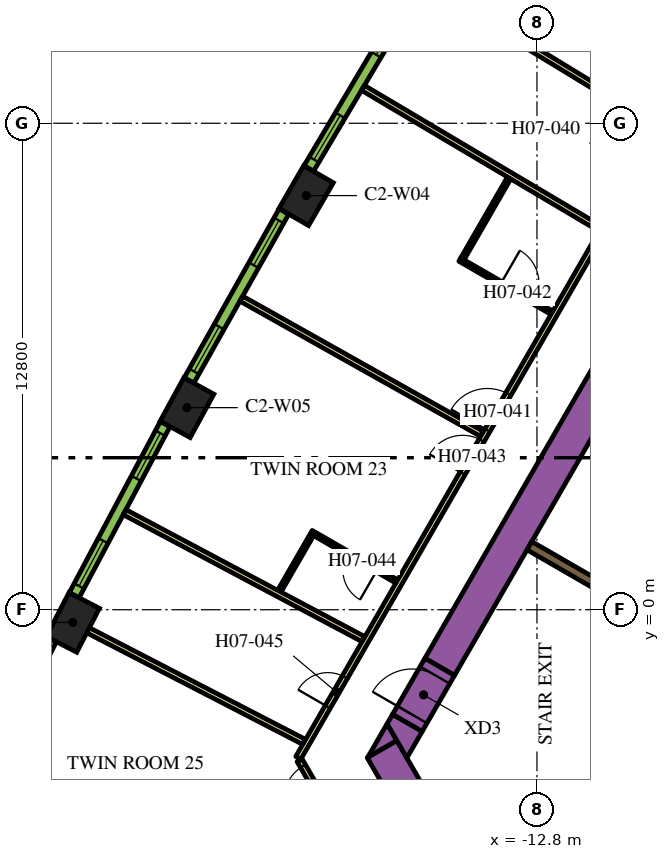
"""IFC4 building model, lengths in metres.
Left out: names, types, materials, properties, quantities, classifications, styles, units other than length and angle.
Written with IfcOpenShell. Run it as: python <this file> out.ifc"""

import sys

from ifc_helpers import new_model, si_unit, direction, frame, frame_2d, origin, origin_2d, place, context, subcontext, project, spatial, polyline, rectangle, outline, extrude, element, fill, save


model = new_model("IFC4")
c1 = context("Model", 3, precision=1e-05, world=origin(), true_north=direction((0.0, 1.0)))
c2 = subcontext(c1, "Body", "Model", "MODEL_VIEW")
j1 = project(units=[si_unit("LENGTHUNIT", "METRE"), si_unit("PLANEANGLEUNIT", "RADIAN")], contexts=[c1])
p1 = place(None, origin())
s1 = spatial("IfcSite", under=j1, at=p1, CompositionType="ELEMENT")
p2 = place(p1, origin())
s2 = spatial("IfcBuilding", under=s1, at=p2, CompositionType="ELEMENT")
p3 = place(p2, frame((0.0, 0.0, 103.2)))
s3 = spatial("IfcBuildingStorey", under=s2, at=p3, CompositionType="ELEMENT", Elevation=103.2)
for number, where, z_axis, x_axis in (
    (1, (-18.874, 10.897, 0.0), (0.0, 0.0, 1.0), (-0.5, -0.866, 0.0)),
    (2, (-22.009, 5.317, 0.0), (0.0, 0.0, 1.0), (-0.48, -0.877, 0.0)),
    (3, (-25.012, -0.334, 0.0), (0.0, 0.0, 1.0), (-0.459, -0.888, 0.0)),
):
    element("IfcColumn", number, at=place(p3, frame(where, z_axis=z_axis, x_axis=x_axis)), inside=s3, PredefinedType="COLUMN", context=c2, shape_type="SweptSolid", body=[
        extrude(rectangle(XDim=1.3, YDim=0.9, at=origin_2d()), origin(), (0.0, 0.0, 1.0), 3.9),
    ])
p4 = place(p3, frame((-15.36, -1.503, 0.0), z_axis=(0.0, 0.0, 1.0), x_axis=(0.50000389221, 0.866023156604, 0.0)))
e4 = element("IfcWall", 4, at=p4, inside=s3, PredefinedType="SOLIDWALL", context=c2, shape_type="SweptSolid", body=[
    extrude(rectangle(XDim=21.0, YDim=0.9, at=frame_2d((10.5, 0.0))), origin(), (0.0, 0.0, 1.0), 3.9),
])
p5 = place(p3, frame((-12.134, -11.883, 0.0), z_axis=(0.0, 0.0, 1.0), x_axis=(-0.500005339912, 0.866022320763, 0.0)))
e5 = element("IfcWall", 5, at=p5, inside=s3, PredefinedType="SOLIDWALL", context=c2, shape_type="SweptSolid", body=[
    extrude(rectangle(XDim=9.488, YDim=0.9, at=frame_2d((4.744, 0.0))), origin(), (0.0, 0.0, 1.0), 3.9),
])
p6 = place(p3, origin())
e6 = element("IfcWall", 6, at=p6, inside=s3, PredefinedType="SOLIDWALL", context=c2, shape_type="SweptSolid", body=[
    extrude(outline(polyline([(-16.489, -3.44), (-17.251, -3.88), (-16.743, -3.0), (-16.489, -3.44)])), origin(), (0.0, 0.0, 1.0), 3.9),
])
e7 = element("IfcWall", 7, at=p6, inside=s3, PredefinedType="SOLIDWALL", context=c2, shape_type="SweptSolid", body=[
    extrude(outline(polyline([(-15.82, -3.201), (-16.223, -3.9), (-16.743, -3.0), (-16.599, -2.751), (-15.82, -3.201)])), origin(), (0.0, 0.0, 1.0), 3.9),
])
p7 = place(p3, frame((-14.44, -6.49, 0.0), z_axis=(0.0, 0.0, 1.0), x_axis=(0.866022966069, 0.500004222222, 0.0)))
e8 = element("IfcWall", 8, at=p7, inside=s3, PredefinedType="SOLIDWALL", context=c2, shape_type="SweptSolid", body=[
    extrude(rectangle(XDim=6.8, YDim=0.25, at=frame_2d((3.4, 0.0))), origin(), (0.0, 0.0, 1.0), 3.9),
])
p8 = place(p3, frame((-8.106, -1.14, 0.0), z_axis=(0.0, 0.0, 1.0), x_axis=(-0.866000643155, 0.500042884217, 0.0)))
e9 = element("IfcWall", 9, at=p8, inside=s3, PredefinedType="SOLIDWALL", context=c2, shape_type="SweptSolid", body=[
    extrude(rectangle(XDim=5.65, YDim=0.25, at=frame_2d((2.825, 0.0))), origin(), (0.0, 0.0, 1.0), 3.9),
])
p9 = place(p3, frame((-16.209, -2.976, 0.0), z_axis=(0.0, 0.0, 1.0), x_axis=(0.499954529098, 0.86605165483, 0.0)))
e10 = element("IfcWall", 10, at=p9, inside=s3, PredefinedType="SOLIDWALL", context=c2, shape_type="SweptSolid", body=[
    extrude(rectangle(XDim=1.7, YDim=0.9, at=frame_2d((0.85, 0.0))), origin(), (0.0, 0.0, 1.0), 3.9),
])
p10 = place(p9, frame((0.25, 0.0, 0.0)))
e11 = element("IfcOpeningElement", 11, at=p10, cuts=e10, PredefinedType="OPENING", context=c2, shape_type="SweptSolid", body=[
    extrude(rectangle(XDim=1.2, YDim=2.1, at=frame_2d((0.6, 1.05))), frame((0.0, 0.46, 0.0), z_axis=(0.0, -1.0, 0.0), x_axis=(1.0, 0.0, 0.0)), (0.0, 0.0, 1.0), 0.92),
])
p11 = place(p3, frame((-19.081, -3.9, 0.0), z_axis=(0.0, 0.0, 1.0), x_axis=(0.499998313975, 0.866026377209, 0.0)))
e12 = element("IfcWall", 12, at=p11, inside=s3, PredefinedType="PARTITIONING", context=c2, shape_type="SweptSolid", body=[
    extrude(rectangle(XDim=25.766, YDim=0.15, at=frame_2d((12.883, 0.0))), origin(), (0.0, 0.0, 1.0), 2.75),
])
p12 = place(p11, frame((19.306, 0.0, 0.0)))
e13 = element("IfcOpeningElement", 13, at=p12, cuts=e12, PredefinedType="OPENING", context=c2, shape_type="SweptSolid", body=[
    extrude(rectangle(XDim=1.0, YDim=2.1, at=frame_2d((0.5, 1.05))), frame((0.0, 0.085, 0.0), z_axis=(0.0, -1.0, 0.0), x_axis=(1.0, 0.0, 0.0)), (0.0, 0.0, 1.0), 0.17),
])
p13 = place(p11, frame((17.144, 0.0, 0.0)))
e14 = element("IfcOpeningElement", 14, at=p13, cuts=e12, PredefinedType="OPENING", context=c2, shape_type="SweptSolid", body=[
    extrude(rectangle(XDim=0.9, YDim=2.1, at=frame_2d((0.45, 1.05))), frame((0.0, 0.085, 0.0), z_axis=(0.0, -1.0, 0.0), x_axis=(1.0, 0.0, 0.0)), (0.0, 0.0, 1.0), 0.17),
])
p14 = place(p11, frame((9.955, 0.0, 0.0)))
e15 = element("IfcOpeningElement", 15, at=p14, cuts=e12, PredefinedType="OPENING", context=c2, shape_type="SweptSolid", body=[
    extrude(rectangle(XDim=1.1, YDim=2.1, at=frame_2d((0.55, 1.05))), frame((0.0, 0.085, 0.0), z_axis=(0.0, -1.0, 0.0), x_axis=(1.0, 0.0, 0.0)), (0.0, 0.0, 1.0), 0.17),
])
p15 = place(p11, frame((8.648, 0.0, 0.0)))
e16 = element("IfcOpeningElement", 16, at=p15, cuts=e12, PredefinedType="OPENING", context=c2, shape_type="SweptSolid", body=[
    extrude(rectangle(XDim=1.0, YDim=2.1, at=frame_2d((0.5, 1.05))), frame((0.0, 0.085, 0.0), z_axis=(0.0, -1.0, 0.0), x_axis=(1.0, 0.0, 0.0)), (0.0, 0.0, 1.0), 0.17),
])
p16 = place(p11, frame((1.553, 0.0, 0.0)))
e17 = element("IfcOpeningElement", 17, at=p16, cuts=e12, PredefinedType="OPENING", context=c2, shape_type="SweptSolid", body=[
    extrude(rectangle(XDim=0.9, YDim=2.1, at=frame_2d((0.45, 1.05))), frame((0.0, 0.085, 0.0), z_axis=(0.0, -1.0, 0.0), x_axis=(1.0, 0.0, 0.0)), (0.0, 0.0, 1.0), 0.17),
])
p17 = place(p3, frame((-16.412, -8.523, 0.0), z_axis=(0.0, 0.0, 1.0), x_axis=(-0.500001929737, 0.866024289647, 0.0)))
e18 = element("IfcWall", 18, at=p17, inside=s3, PredefinedType="PARTITIONING", context=c2, shape_type="SweptSolid", body=[
    extrude(rectangle(XDim=5.268, YDim=0.15, at=frame_2d((2.634, 0.0))), origin(), (0.0, 0.0, 1.0), 2.75),
])
p18 = place(p17, frame((4.088, 0.0, 0.0)))
e19 = element("IfcOpeningElement", 19, at=p18, cuts=e18, PredefinedType="OPENING", context=c2, shape_type="SweptSolid", body=[
    extrude(rectangle(XDim=1.0, YDim=2.1, at=frame_2d((0.5, 1.05))), frame((0.0, 0.085, 0.0), z_axis=(0.0, -1.0, 0.0), x_axis=(1.0, 0.0, 0.0)), (0.0, 0.0, 1.0), 0.17),
])
p19 = place(p3, frame((-24.613, -0.541, 0.0), z_axis=(0.0, 0.0, 1.0), x_axis=(0.888459912519, -0.458954228487, 0.0)))
e20 = element("IfcWall", 20, at=p19, inside=s3, PredefinedType="PARTITIONING", context=c2, shape_type="SweptSolid", body=[
    extrude(rectangle(XDim=6.392, YDim=0.15, at=frame_2d((3.196, 0.0))), origin(), (0.0, 0.0, 1.0), 2.75),
])
p20 = place(p3, frame((-23.652, 2.567, 0.0), z_axis=(0.0, 0.0, 1.0), x_axis=(0.883019237957, -0.469336793144, 0.0)))
e21 = element("IfcWall", 21, at=p20, inside=s3, PredefinedType="PARTITIONING", context=c2, shape_type="SweptSolid", body=[
    extrude(rectangle(XDim=7.111, YDim=0.15, at=frame_2d((3.555, 0.0))), origin(), (0.0, 0.0, 1.0), 2.75),
])
for number, where, z_axis, x_axis in (
    (22, (-20.581, 8.185, 0.0), (0.0, 0.0, 1.0), (0.872, -0.49, 0.0)),
    (23, (-17.379, 13.731, 0.0), (0.0, 0.0, 1.0), (0.86, -0.51, 0.0)),
):
    element("IfcWall", number, at=place(p3, frame(where, z_axis=z_axis, x_axis=x_axis)), inside=s3, PredefinedType="PARTITIONING", context=c2, shape_type="SweptSolid", body=[
        extrude(rectangle(XDim=7.257, YDim=0.15, at=frame_2d((3.628, 0.0))), origin(), (0.0, 0.0, 1.0), 2.75),
    ])
p21 = place(p3, frame((-15.225, 16.167, 0.0), z_axis=(0.0, 0.0, 1.0), x_axis=(0.854088713274, -0.520127359266, 0.0)))
e24 = element("IfcWall", 24, at=p21, inside=s3, PredefinedType="PARTITIONING", context=c2, shape_type="SweptSolid", body=[
    extrude(rectangle(XDim=6.611, YDim=0.15, at=frame_2d((3.305, 0.0))), origin(), (0.0, 0.0, 1.0), 2.75),
])
p22 = place(p3, frame((-14.83, 9.213, 0.0), z_axis=(0.0, 0.0, 1.0), x_axis=(0.866034573852, -0.49998411664, 0.0)))
e25 = element("IfcWall", 25, at=p22, inside=s3, PredefinedType="PARTITIONING", context=c2, shape_type="SweptSolid", body=[
    extrude(rectangle(XDim=2.8, YDim=0.1, at=frame_2d((1.4, 0.0))), origin(), (0.0, 0.0, 1.0), 2.75),
])
p23 = place(p22, frame((1.25, 0.0, 0.0)))
e26 = element("IfcOpeningElement", 26, at=p23, cuts=e25, PredefinedType="OPENING", context=c2, shape_type="SweptSolid", body=[
    extrude(rectangle(XDim=1.0, YDim=2.1, at=frame_2d((0.5, 1.05))), frame((0.0, 0.06, 0.0), z_axis=(0.0, -1.0, 0.0), x_axis=(1.0, 0.0, 0.0)), (0.0, 0.0, 1.0), 0.12),
])
p24 = place(p3, frame((-14.762, 9.231, 0.0), z_axis=(0.0, 0.0, 1.0), x_axis=(0.500003092839, 0.866023618125, 0.0)))
e27 = element("IfcWall", 27, at=p24, inside=s3, PredefinedType="PARTITIONING", context=c2, shape_type="SweptSolid", body=[
    extrude(rectangle(XDim=2.46, YDim=0.1, at=frame_2d((1.23, 0.0))), origin(), (0.0, 0.0, 1.0), 2.75),
])
p25 = place(p3, frame((-16.487, 0.743, 0.0), z_axis=(0.0, 0.0, 1.0), x_axis=(-0.866021400173, 0.500006934395, 0.0)))
e28 = element("IfcWall", 28, at=p25, inside=s3, PredefinedType="PARTITIONING", context=c2, shape_type="SweptSolid", body=[
    extrude(rectangle(XDim=2.6, YDim=0.1, at=frame_2d((1.3, 0.0))), origin(), (0.0, 0.0, 1.0), 2.75),
])
p26 = place(p25, frame((0.6, 0.0, 0.0)))
e29 = element("IfcOpeningElement", 29, at=p26, cuts=e28, PredefinedType="OPENING", context=c2, shape_type="SweptSolid", body=[
    extrude(rectangle(XDim=0.9, YDim=2.1, at=frame_2d((0.45, 1.05))), frame((0.0, 0.06, 0.0), z_axis=(0.0, -1.0, 0.0), x_axis=(1.0, 0.0, 0.0)), (0.0, 0.0, 1.0), 0.12),
])
p27 = place(p3, frame((-18.726, 1.966, 0.0), z_axis=(0.0, 0.0, 1.0), x_axis=(-0.499954529098, -0.86605165483, 0.0)))
e30 = element("IfcWall", 30, at=p27, inside=s3, PredefinedType="PARTITIONING", context=c2, shape_type="SweptSolid", body=[
    extrude(rectangle(XDim=1.7, YDim=0.1, at=frame_2d((0.85, 0.0))), origin(), (0.0, 0.0, 1.0), 2.75),
])
p28 = place(p3, frame((-16.203, 15.998, 0.0), z_axis=(0.0, 0.0, 1.0), x_axis=(-0.510054281659, -0.860142214847, 0.0)))
e31 = element("IfcWall", 31, at=p28, inside=s3, PredefinedType="SOLIDWALL", context=c2, shape_type="SweptSolid", body=[
    extrude(rectangle(XDim=5.101, YDim=0.29, at=frame_2d((2.55, 0.0))), origin(), (0.0, 0.0, 1.0), 3.65),
])
p29 = place(p28, frame((0.273, 0.0, 0.9)))
e32 = element("IfcOpeningElement", 32, at=p29, cuts=e31, PredefinedType="OPENING", context=c2, shape_type="SweptSolid", body=[
    extrude(rectangle(XDim=1.35, YDim=2.15, at=frame_2d((0.675, 1.075))), frame((0.0, 0.155, 0.0), z_axis=(0.0, -1.0, 0.0), x_axis=(1.0, 0.0, 0.0)), (0.0, 0.0, 1.0), 0.31),
])
p30 = place(p28, frame((3.478, 0.0, 0.9)))
e33 = element("IfcOpeningElement", 33, at=p30, cuts=e31, PredefinedType="OPENING", context=c2, shape_type="SweptSolid", body=[
    extrude(rectangle(XDim=1.35, YDim=2.15, at=frame_2d((0.675, 1.075))), frame((0.0, 0.155, 0.0), z_axis=(0.0, -1.0, 0.0), x_axis=(1.0, 0.0, 0.0)), (0.0, 0.0, 1.0), 0.31),
])
p31 = place(p3, frame((-19.458, 10.48, 0.0), z_axis=(0.0, 0.0, 1.0), x_axis=(-0.48983164787, -0.87181704316, 0.0)))
e34 = element("IfcWall", 34, at=p31, inside=s3, PredefinedType="SOLIDWALL", context=c2, shape_type="SweptSolid", body=[
    extrude(rectangle(XDim=5.1, YDim=0.29, at=frame_2d((2.55, 0.0))), origin(), (0.0, 0.0, 1.0), 3.65),
])
p32 = place(p31, frame((0.272, 0.0, 0.9)))
e35 = element("IfcOpeningElement", 35, at=p32, cuts=e34, PredefinedType="OPENING", context=c2, shape_type="SweptSolid", body=[
    extrude(rectangle(XDim=1.35, YDim=2.15, at=frame_2d((0.675, 1.075))), frame((0.0, 0.155, 0.0), z_axis=(0.0, -1.0, 0.0), x_axis=(1.0, 0.0, 0.0)), (0.0, 0.0, 1.0), 0.31),
])
p33 = place(p31, frame((3.478, 0.0, 0.9)))
e36 = element("IfcOpeningElement", 36, at=p33, cuts=e34, PredefinedType="OPENING", context=c2, shape_type="SweptSolid", body=[
    extrude(rectangle(XDim=1.35, YDim=2.15, at=frame_2d((0.675, 1.075))), frame((0.0, 0.155, 0.0), z_axis=(0.0, -1.0, 0.0), x_axis=(1.0, 0.0, 0.0)), (0.0, 0.0, 1.0), 0.31),
])
p34 = place(p3, frame((-22.583, 4.887, 0.0), z_axis=(0.0, 0.0, 1.0), x_axis=(-0.469323203119, -0.883026461106, 0.0)))
e37 = element("IfcWall", 37, at=p34, inside=s3, PredefinedType="SOLIDWALL", context=c2, shape_type="SweptSolid", body=[
    extrude(rectangle(XDim=5.101, YDim=0.29, at=frame_2d((2.55, 0.0))), origin(), (0.0, 0.0, 1.0), 3.65),
])
p35 = place(p34, frame((0.273, 0.0, 0.9)))
e38 = element("IfcOpeningElement", 38, at=p35, cuts=e37, PredefinedType="OPENING", context=c2, shape_type="SweptSolid", body=[
    extrude(rectangle(XDim=1.35, YDim=2.15, at=frame_2d((0.675, 1.075))), frame((0.0, 0.155, 0.0), z_axis=(0.0, -1.0, 0.0), x_axis=(1.0, 0.0, 0.0)), (0.0, 0.0, 1.0), 0.31),
])
p36 = place(p34, frame((3.478, 0.0, 0.9)))
e39 = element("IfcOpeningElement", 39, at=p36, cuts=e37, PredefinedType="OPENING", context=c2, shape_type="SweptSolid", body=[
    extrude(rectangle(XDim=1.35, YDim=2.15, at=frame_2d((0.675, 1.075))), frame((0.0, 0.155, 0.0), z_axis=(0.0, -1.0, 0.0), x_axis=(1.0, 0.0, 0.0)), (0.0, 0.0, 1.0), 0.31),
])
p37 = place(p3, frame((-25.576, -0.778, 0.0), z_axis=(0.0, 0.0, 1.0), x_axis=(-0.448534297211, -0.893765620409, 0.0)))
e40 = element("IfcWall", 40, at=p37, inside=s3, PredefinedType="SOLIDWALL", context=c2, shape_type="SweptSolid", body=[
    extrude(rectangle(XDim=5.1, YDim=0.29, at=frame_2d((2.55, 0.0))), origin(), (0.0, 0.0, 1.0), 3.65),
])
p38 = place(p37, frame((0.272, 0.0, 0.9)))
e41 = element("IfcOpeningElement", 41, at=p38, cuts=e40, PredefinedType="OPENING", context=c2, shape_type="SweptSolid", body=[
    extrude(rectangle(XDim=1.35, YDim=2.15, at=frame_2d((0.675, 1.075))), frame((0.0, 0.155, 0.0), z_axis=(0.0, -1.0, 0.0), x_axis=(1.0, 0.0, 0.0)), (0.0, 0.0, 1.0), 0.31),
])
p39 = place(p37, frame((3.478, 0.0, 0.9)))
e42 = element("IfcOpeningElement", 42, at=p39, cuts=e40, PredefinedType="OPENING", context=c2, shape_type="SweptSolid", body=[
    extrude(rectangle(XDim=1.35, YDim=2.15, at=frame_2d((0.675, 1.075))), frame((0.0, 0.155, 0.0), z_axis=(0.0, -1.0, 0.0), x_axis=(1.0, 0.0, 0.0)), (0.0, 0.0, 1.0), 0.31),
])
p40 = place(p10, origin())
e43 = element("IfcDoor", 43, at=p40, inside=s3, OperationType="SINGLE_SWING_LEFT", PredefinedType="DOOR", context=c2, shape_type="SweptSolid", body=[
    extrude(rectangle(XDim=1.2, YDim=2.1, at=frame_2d((0.6, 1.05))), frame((0.0, 0.025, 0.0), z_axis=(0.0, -1.0, 0.0), x_axis=(1.0, 0.0, 0.0)), (0.0, 0.0, 1.0), 0.05),
])
fill(e11, e43)
p41 = place(p14, origin())
e44 = element("IfcDoor", 44, at=p41, inside=s3, OperationType="SINGLE_SWING_LEFT", PredefinedType="DOOR", context=c2, shape_type="SweptSolid", body=[
    extrude(rectangle(XDim=1.1, YDim=2.1, at=frame_2d((0.55, 1.05))), frame((0.0, 0.025, 0.0), z_axis=(0.0, -1.0, 0.0), x_axis=(1.0, 0.0, 0.0)), (0.0, 0.0, 1.0), 0.05),
])
fill(e15, e44)
p42 = place(p23, origin())
e45 = element("IfcDoor", 45, at=p42, inside=s3, OperationType="SINGLE_SWING_LEFT", PredefinedType="DOOR", context=c2, shape_type="SweptSolid", body=[
    extrude(rectangle(XDim=1.0, YDim=2.1, at=frame_2d((0.5, 1.05))), frame((0.0, 0.025, 0.0), z_axis=(0.0, -1.0, 0.0), x_axis=(1.0, 0.0, 0.0)), (0.0, 0.0, 1.0), 0.05),
])
fill(e26, e45)
p43 = place(p15, origin())
e46 = element("IfcDoor", 46, at=p43, inside=s3, OperationType="SINGLE_SWING_RIGHT", PredefinedType="DOOR", context=c2, shape_type="SweptSolid", body=[
    extrude(rectangle(XDim=1.0, YDim=2.1, at=frame_2d((0.5, 1.05))), frame((0.0, 0.025, 0.0), z_axis=(0.0, -1.0, 0.0), x_axis=(1.0, 0.0, 0.0)), (0.0, 0.0, 1.0), 0.05),
])
fill(e16, e46)
p44 = place(p26, origin())
e47 = element("IfcDoor", 47, at=p44, inside=s3, OperationType="SINGLE_SWING_LEFT", PredefinedType="DOOR", context=c2, shape_type="SweptSolid", body=[
    extrude(rectangle(XDim=0.9, YDim=2.1, at=frame_2d((0.45, 1.05))), frame((0.0, 0.025, 0.0), z_axis=(0.0, -1.0, 0.0), x_axis=(1.0, 0.0, 0.0)), (0.0, 0.0, 1.0), 0.05),
])
fill(e29, e47)
p45 = place(p16, origin())
e48 = element("IfcDoor", 48, at=p45, inside=s3, OperationType="SINGLE_SWING_RIGHT", PredefinedType="DOOR", context=c2, shape_type="SweptSolid", body=[
    extrude(rectangle(XDim=0.9, YDim=2.1, at=frame_2d((0.45, 1.05))), frame((0.0, 0.025, 0.0), z_axis=(0.0, -1.0, 0.0), x_axis=(1.0, 0.0, 0.0)), (0.0, 0.0, 1.0), 0.05),
])
fill(e17, e48)
p46 = place(p18, origin())
e49 = element("IfcDoor", 49, at=p46, inside=s3, OperationType="SINGLE_SWING_RIGHT", PredefinedType="DOOR", context=c2, shape_type="SweptSolid", body=[
    extrude(rectangle(XDim=1.0, YDim=2.1, at=frame_2d((0.5, 1.05))), frame((0.0, 0.025, 0.0), z_axis=(0.0, -1.0, 0.0), x_axis=(1.0, 0.0, 0.0)), (0.0, 0.0, 1.0), 0.05),
])
fill(e19, e49)
p47 = place(p29, origin())
e50 = element("IfcWindow", 50, at=p47, inside=s3, PartitioningType="DOUBLE_PANEL_VERTICAL", PredefinedType="WINDOW", context=c2, shape_type="SweptSolid", body=[
    extrude(rectangle(XDim=1.35, YDim=2.15, at=frame_2d((0.675, 1.075))), frame((0.0, 0.015, 0.0), z_axis=(0.0, -1.0, 0.0), x_axis=(1.0, 0.0, 0.0)), (0.0, 0.0, 1.0), 0.06),
])
fill(e32, e50)
p48 = place(p30, origin())
e51 = element("IfcWindow", 51, at=p48, inside=s3, PartitioningType="DOUBLE_PANEL_VERTICAL", PredefinedType="WINDOW", context=c2, shape_type="SweptSolid", body=[
    extrude(rectangle(XDim=1.35, YDim=2.15, at=frame_2d((0.675, 1.075))), frame((0.0, 0.015, 0.0), z_axis=(0.0, -1.0, 0.0), x_axis=(1.0, 0.0, 0.0)), (0.0, 0.0, 1.0), 0.06),
])
fill(e33, e51)
p49 = place(p32, origin())
e52 = element("IfcWindow", 52, at=p49, inside=s3, PartitioningType="DOUBLE_PANEL_VERTICAL", PredefinedType="WINDOW", context=c2, shape_type="SweptSolid", body=[
    extrude(rectangle(XDim=1.35, YDim=2.15, at=frame_2d((0.675, 1.075))), frame((0.0, 0.015, 0.0), z_axis=(0.0, -1.0, 0.0), x_axis=(1.0, 0.0, 0.0)), (0.0, 0.0, 1.0), 0.06),
])
fill(e35, e52)
p50 = place(p33, origin())
e53 = element("IfcWindow", 53, at=p50, inside=s3, PartitioningType="DOUBLE_PANEL_VERTICAL", PredefinedType="WINDOW", context=c2, shape_type="SweptSolid", body=[
    extrude(rectangle(XDim=1.35, YDim=2.15, at=frame_2d((0.675, 1.075))), frame((0.0, 0.015, 0.0), z_axis=(0.0, -1.0, 0.0), x_axis=(1.0, 0.0, 0.0)), (0.0, 0.0, 1.0), 0.06),
])
fill(e36, e53)
p51 = place(p35, origin())
e54 = element("IfcWindow", 54, at=p51, inside=s3, PartitioningType="DOUBLE_PANEL_VERTICAL", PredefinedType="WINDOW", context=c2, shape_type="SweptSolid", body=[
    extrude(rectangle(XDim=1.35, YDim=2.15, at=frame_2d((0.675, 1.075))), frame((0.0, 0.015, 0.0), z_axis=(0.0, -1.0, 0.0), x_axis=(1.0, 0.0, 0.0)), (0.0, 0.0, 1.0), 0.06),
])
fill(e38, e54)
p52 = place(p36, origin())
e55 = element("IfcWindow", 55, at=p52, inside=s3, PartitioningType="DOUBLE_PANEL_VERTICAL", PredefinedType="WINDOW", context=c2, shape_type="SweptSolid", body=[
    extrude(rectangle(XDim=1.35, YDim=2.15, at=frame_2d((0.675, 1.075))), frame((0.0, 0.015, 0.0), z_axis=(0.0, -1.0, 0.0), x_axis=(1.0, 0.0, 0.0)), (0.0, 0.0, 1.0), 0.06),
])
fill(e39, e55)
save(model, sys.argv[1])
